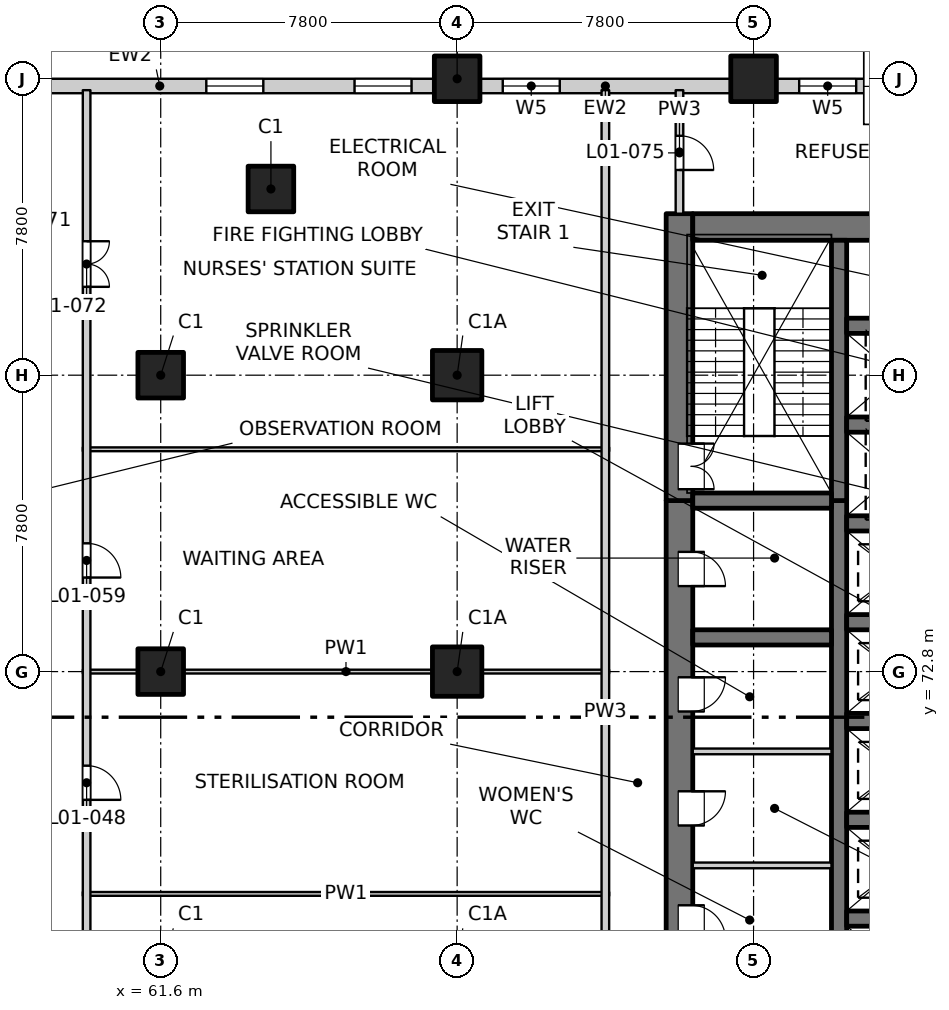
"""IFC4 building model, lengths in metres.
Left out: names, types, materials, properties, quantities, classifications, styles, units other than length and angle.
Written with IfcOpenShell. Run it as: python <this file> out.ifc"""

import sys

from ifc_helpers import new_model, si_unit, direction, frame, frame_2d, origin, origin_2d, place, context, subcontext, project, spatial, rectangle, extrude, element, fill, save


model = new_model("IFC4")
c1 = context("Model", 3, precision=1e-05, world=origin(), true_north=direction((0.0, 1.0)))
c2 = subcontext(c1, "Body", "Model", "MODEL_VIEW")
j1 = project(units=[si_unit("LENGTHUNIT", "METRE"), si_unit("PLANEANGLEUNIT", "RADIAN")], contexts=[c1])
p1 = place(None, origin())
s1 = spatial("IfcSite", under=j1, at=p1, CompositionType="ELEMENT")
p2 = place(p1, origin())
s2 = spatial("IfcBuilding", under=s1, at=p2, CompositionType="ELEMENT")
p3 = place(p2, frame((0.0, 0.0, 6.0)))
s3 = spatial("IfcBuildingStorey", under=s2, at=p3, CompositionType="ELEMENT", Elevation=6.0)
for number, where, z_axis, x_axis in (
    (1, (64.5, 85.5, -0.3), (0.0, 0.0, 1.0), (1.0, 0.0, 0.0)),
    (2, (69.4, 88.4, -0.3), (0.0, 0.0, 1.0), (1.0, 0.0, 0.0)),
    (3, (77.2, 88.4, -0.3), (0.0, 0.0, 1.0), (1.0, 0.0, 0.0)),
    (4, (61.6, 72.8, -0.3), (0.0, 0.0, 1.0), (1.0, 0.0, 0.0)),
    (5, (61.6, 80.6, -0.3), (0.0, 0.0, 1.0), (1.0, 0.0, 0.0)),
):
    element("IfcColumn", number, at=place(p3, frame(where, z_axis=z_axis, x_axis=x_axis)), inside=s3, PredefinedType="COLUMN", context=c2, shape_type="SweptSolid", body=[
        extrude(rectangle(XDim=1.2, YDim=1.2, at=origin_2d()), origin(), (0.0, 0.0, 1.0), 4.5),
    ])
for number, where, z_axis, x_axis in (
    (6, (69.4, 72.8, -0.3), (0.0, 0.0, 1.0), (1.0, 0.0, 0.0)),
    (7, (69.4, 80.6, -0.3), (0.0, 0.0, 1.0), (1.0, 0.0, 0.0)),
):
    element("IfcColumn", number, at=place(p3, frame(where, z_axis=z_axis, x_axis=x_axis)), inside=s3, PredefinedType="COLUMN", context=c2, shape_type="SweptSolid", body=[
        extrude(rectangle(XDim=1.3, YDim=1.3, at=origin_2d()), origin(), (0.0, 0.0, 1.0), 4.5),
    ])
p4 = place(p3, frame((75.25, 54.9, -0.3), z_axis=(0.0, 0.0, 1.0), x_axis=(0.0, 1.0, 0.0)))
e8 = element("IfcWall", 8, at=p4, inside=s3, PredefinedType="SOLIDWALL", context=c2, shape_type="SweptSolid", body=[
    extrude(rectangle(XDim=22.4, YDim=0.7, at=frame_2d((11.2, 0.0))), origin(), (0.0, 0.0, 1.0), 4.5),
])
p5 = place(p4, frame((7.55, 0.0, 0.3)))
e9 = element("IfcOpeningElement", 9, at=p5, cuts=e8, PredefinedType="OPENING", context=c2, shape_type="SweptSolid", body=[
    extrude(rectangle(XDim=0.9, YDim=2.1, at=frame_2d((0.45, 1.05))), frame((0.0, 0.36, 0.0), z_axis=(0.0, -1.0, 0.0), x_axis=(1.0, 0.0, 0.0)), (0.0, 0.0, 1.0), 0.72),
])
p6 = place(p4, frame((10.85, 0.0, 0.3)))
e10 = element("IfcOpeningElement", 10, at=p6, cuts=e8, PredefinedType="OPENING", context=c2, shape_type="SweptSolid", body=[
    extrude(rectangle(XDim=0.9, YDim=2.1, at=frame_2d((0.45, 1.05))), frame((0.0, 0.36, 0.0), z_axis=(0.0, -1.0, 0.0), x_axis=(1.0, 0.0, 0.0)), (0.0, 0.0, 1.0), 0.72),
])
p7 = place(p4, frame((13.85, 0.0, 0.3)))
e11 = element("IfcOpeningElement", 11, at=p7, cuts=e8, PredefinedType="OPENING", context=c2, shape_type="SweptSolid", body=[
    extrude(rectangle(XDim=0.9, YDim=2.1, at=frame_2d((0.45, 1.05))), frame((0.0, 0.36, 0.0), z_axis=(0.0, -1.0, 0.0), x_axis=(1.0, 0.0, 0.0)), (0.0, 0.0, 1.0), 0.72),
])
p8 = place(p4, frame((16.85, 0.0, 0.3)))
e12 = element("IfcOpeningElement", 12, at=p8, cuts=e8, PredefinedType="OPENING", context=c2, shape_type="SweptSolid", body=[
    extrude(rectangle(XDim=0.9, YDim=2.1, at=frame_2d((0.45, 1.05))), frame((0.0, 0.36, 0.0), z_axis=(0.0, -1.0, 0.0), x_axis=(1.0, 0.0, 0.0)), (0.0, 0.0, 1.0), 0.72),
])
p9 = place(p4, frame((20.15, 0.0, 0.3)))
e13 = element("IfcOpeningElement", 13, at=p9, cuts=e8, PredefinedType="OPENING", context=c2, shape_type="SweptSolid", body=[
    extrude(rectangle(XDim=0.9, YDim=2.1, at=frame_2d((0.45, 1.05))), frame((0.0, 0.36, 0.0), z_axis=(0.0, -1.0, 0.0), x_axis=(1.0, 0.0, 0.0)), (0.0, 0.0, 1.0), 0.72),
])
p10 = place(p3, frame((75.25, 77.3, -0.3), z_axis=(0.0, 0.0, 1.0), x_axis=(0.0, 1.0, 0.0)))
e14 = element("IfcWall", 14, at=p10, inside=s3, PredefinedType="SOLIDWALL", context=c2, shape_type="SweptSolid", body=[
    extrude(rectangle(XDim=7.55, YDim=0.7, at=frame_2d((3.775, 0.0))), origin(), (0.0, 0.0, 1.0), 4.5),
])
p11 = place(p10, frame((0.3, 0.0, 0.3)))
e15 = element("IfcOpeningElement", 15, at=p11, cuts=e14, PredefinedType="OPENING", context=c2, shape_type="SweptSolid", body=[
    extrude(rectangle(XDim=1.2, YDim=2.1, at=frame_2d((0.6, 1.05))), frame((0.0, 0.36, 0.0), z_axis=(0.0, -1.0, 0.0), x_axis=(1.0, 0.0, 0.0)), (0.0, 0.0, 1.0), 0.72),
])
p12 = place(p3, frame((75.6, 84.5, -0.3), z_axis=(0.0, 0.0, 1.0), x_axis=(1.0, 0.0, 0.0)))
e16 = element("IfcWall", 16, at=p12, inside=s3, PredefinedType="SOLIDWALL", context=c2, shape_type="SweptSolid", body=[
    extrude(rectangle(XDim=18.8, YDim=0.7, at=frame_2d((9.4, 0.0))), origin(), (0.0, 0.0, 1.0), 4.5),
])
p13 = place(p3, frame((79.45, 60.9, -0.3), z_axis=(0.0, 0.0, 1.0), x_axis=(0.0, 1.0, 0.0)))
e17 = element("IfcWall", 17, at=p13, inside=s3, PredefinedType="SOLIDWALL", context=c2, shape_type="SweptSolid", body=[
    extrude(rectangle(XDim=16.4, YDim=0.4, at=frame_2d((8.2, 0.0))), origin(), (0.0, 0.0, 1.0), 4.5),
])
p14 = place(p3, frame((79.45, 77.3, -0.3), z_axis=(0.0, 0.0, 1.0), x_axis=(0.0, 1.0, 0.0)))
e18 = element("IfcWall", 18, at=p14, inside=s3, PredefinedType="SOLIDWALL", context=c2, shape_type="SweptSolid", body=[
    extrude(rectangle(XDim=6.85, YDim=0.4, at=frame_2d((3.425, 0.0))), origin(), (0.0, 0.0, 1.0), 4.5),
])
for number, where, z_axis, x_axis in (
    (19, (79.65, 66.3, -0.3), (0.0, 0.0, 1.0), (1.0, 0.0, 0.0)),
    (20, (79.65, 68.9, -0.3), (0.0, 0.0, 1.0), (1.0, 0.0, 0.0)),
    (21, (79.65, 71.5, -0.3), (0.0, 0.0, 1.0), (1.0, 0.0, 0.0)),
    (22, (79.65, 74.1, -0.3), (0.0, 0.0, 1.0), (1.0, 0.0, 0.0)),
    (23, (79.65, 76.7, -0.3), (0.0, 0.0, 1.0), (1.0, 0.0, 0.0)),
    (24, (79.65, 79.3, -0.3), (0.0, 0.0, 1.0), (1.0, 0.0, 0.0)),
    (25, (79.65, 81.9, -0.3), (0.0, 0.0, 1.0), (1.0, 0.0, 0.0)),
):
    element("IfcWall", number, at=place(p3, frame(where, z_axis=z_axis, x_axis=x_axis)), inside=s3, PredefinedType="SOLIDWALL", context=c2, shape_type="SweptSolid", body=[
        extrude(rectangle(XDim=3.0, YDim=0.4, at=frame_2d((1.5, 0.0))), origin(), (0.0, 0.0, 1.0), 4.5),
    ])
for number, where, z_axis, x_axis in (
    (26, (75.6, 73.7, -0.3), (0.0, 0.0, 1.0), (1.0, 0.0, 0.0)),
    (27, (75.6, 77.3, -0.3), (0.0, 0.0, 1.0), (1.0, 0.0, 0.0)),
):
    element("IfcWall", number, at=place(p3, frame(where, z_axis=z_axis, x_axis=x_axis)), inside=s3, PredefinedType="SOLIDWALL", context=c2, shape_type="SweptSolid", body=[
        extrude(rectangle(XDim=3.65, YDim=0.4, at=frame_2d((1.825, 0.0))), origin(), (0.0, 0.0, 1.0), 4.5),
    ])
p15 = place(p3, frame((54.35, 88.21, 0.0), z_axis=(0.0, 0.0, 1.0), x_axis=(1.0, 0.0, 0.0)))
e28 = element("IfcWall", 28, at=p15, inside=s3, PredefinedType="SOLIDWALL", context=c2, shape_type="SweptSolid", body=[
    extrude(rectangle(XDim=14.45, YDim=0.38, at=frame_2d((7.225, 0.0))), origin(), (0.0, 0.0, 1.0), 4.2),
])
p16 = place(p15, frame((0.65, 0.0, 0.9)))
e29 = element("IfcOpeningElement", 29, at=p16, cuts=e28, PredefinedType="OPENING", context=c2, shape_type="SweptSolid", body=[
    extrude(rectangle(XDim=1.5, YDim=1.5, at=frame_2d((0.75, 0.75))), frame((0.0, 0.2, 0.0), z_axis=(0.0, -1.0, 0.0), x_axis=(1.0, 0.0, 0.0)), (0.0, 0.0, 1.0), 0.4),
])
p17 = place(p15, frame((8.45, 0.0, 0.9)))
e30 = element("IfcOpeningElement", 30, at=p17, cuts=e28, PredefinedType="OPENING", context=c2, shape_type="SweptSolid", body=[
    extrude(rectangle(XDim=1.5, YDim=1.5, at=frame_2d((0.75, 0.75))), frame((0.0, 0.2, 0.0), z_axis=(0.0, -1.0, 0.0), x_axis=(1.0, 0.0, 0.0)), (0.0, 0.0, 1.0), 0.4),
])
p18 = place(p15, frame((12.35, 0.0, 0.9)))
e31 = element("IfcOpeningElement", 31, at=p18, cuts=e28, PredefinedType="OPENING", context=c2, shape_type="SweptSolid", body=[
    extrude(rectangle(XDim=1.5, YDim=1.5, at=frame_2d((0.75, 0.75))), frame((0.0, 0.2, 0.0), z_axis=(0.0, -1.0, 0.0), x_axis=(1.0, 0.0, 0.0)), (0.0, 0.0, 1.0), 0.4),
])
p19 = place(p3, frame((70.0, 88.21, 0.0), z_axis=(0.0, 0.0, 1.0), x_axis=(1.0, 0.0, 0.0)))
e32 = element("IfcWall", 32, at=p19, inside=s3, PredefinedType="SOLIDWALL", context=c2, shape_type="SweptSolid", body=[
    extrude(rectangle(XDim=6.6, YDim=0.38, at=frame_2d((3.3, 0.0))), origin(), (0.0, 0.0, 1.0), 4.2),
])
p20 = place(p19, frame((0.6, 0.0, 0.9)))
e33 = element("IfcOpeningElement", 33, at=p20, cuts=e32, PredefinedType="OPENING", context=c2, shape_type="SweptSolid", body=[
    extrude(rectangle(XDim=1.5, YDim=1.5, at=frame_2d((0.75, 0.75))), frame((0.0, 0.2, 0.0), z_axis=(0.0, -1.0, 0.0), x_axis=(1.0, 0.0, 0.0)), (0.0, 0.0, 1.0), 0.4),
])
p21 = place(p3, frame((77.8, 88.21, 0.0), z_axis=(0.0, 0.0, 1.0), x_axis=(1.0, 0.0, 0.0)))
e34 = element("IfcWall", 34, at=p21, inside=s3, PredefinedType="SOLIDWALL", context=c2, shape_type="SweptSolid", body=[
    extrude(rectangle(XDim=6.6, YDim=0.38, at=frame_2d((3.3, 0.0))), origin(), (0.0, 0.0, 1.0), 4.2),
])
p22 = place(p21, frame((0.6, 0.0, 0.9)))
e35 = element("IfcOpeningElement", 35, at=p22, cuts=e34, PredefinedType="OPENING", context=c2, shape_type="SweptSolid", body=[
    extrude(rectangle(XDim=1.5, YDim=1.5, at=frame_2d((0.75, 0.75))), frame((0.0, 0.2, 0.0), z_axis=(0.0, -1.0, 0.0), x_axis=(1.0, 0.0, 0.0)), (0.0, 0.0, 1.0), 0.4),
])
p23 = place(p21, frame((4.5, 0.0, 0.9)))
e36 = element("IfcOpeningElement", 36, at=p23, cuts=e34, PredefinedType="OPENING", context=c2, shape_type="SweptSolid", body=[
    extrude(rectangle(XDim=1.5, YDim=1.5, at=frame_2d((0.75, 0.75))), frame((0.0, 0.2, 0.0), z_axis=(0.0, -1.0, 0.0), x_axis=(1.0, 0.0, 0.0)), (0.0, 0.0, 1.0), 0.4),
])
p24 = place(p3, frame((59.55, 66.95, 0.0), z_axis=(0.0, 0.0, 1.0), x_axis=(1.0, 0.0, 0.0)))
e37 = element("IfcWall", 37, at=p24, inside=s3, PredefinedType="PARTITIONING", context=c2, shape_type="SweptSolid", body=[
    extrude(rectangle(XDim=13.85, YDim=0.1, at=frame_2d((6.925, 0.0))), origin(), (0.0, 0.0, 1.0), 4.2),
])
for number, where, z_axis, x_axis in (
    (38, (75.6, 67.7, 0.0), (0.0, 0.0, 1.0), (1.0, 0.0, 0.0)),
    (39, (75.6, 70.7, 0.0), (0.0, 0.0, 1.0), (1.0, 0.0, 0.0)),
):
    element("IfcWall", number, at=place(p3, frame(where, z_axis=z_axis, x_axis=x_axis)), inside=s3, PredefinedType="PARTITIONING", context=c2, shape_type="SweptSolid", body=[
        extrude(rectangle(XDim=3.65, YDim=0.15, at=frame_2d((1.825, 0.0))), origin(), (0.0, 0.0, 1.0), 4.2),
    ])
for number, where, z_axis, x_axis in (
    (40, (59.55, 72.8, 0.0), (0.0, 0.0, 1.0), (1.0, 0.0, 0.0)),
    (41, (59.55, 78.65, 0.0), (0.0, 0.0, 1.0), (1.0, 0.0, 0.0)),
):
    element("IfcWall", number, at=place(p3, frame(where, z_axis=z_axis, x_axis=x_axis)), inside=s3, PredefinedType="PARTITIONING", context=c2, shape_type="SweptSolid", body=[
        extrude(rectangle(XDim=13.85, YDim=0.1, at=frame_2d((6.925, 0.0))), origin(), (0.0, 0.0, 1.0), 4.2),
    ])
p25 = place(p3, frame((59.65, 55.35, 0.0), z_axis=(0.0, 0.0, 1.0), x_axis=(0.0, 1.0, 0.0)))
e42 = element("IfcWall", 42, at=p25, inside=s3, PredefinedType="PARTITIONING", context=c2, shape_type="SweptSolid", body=[
    extrude(rectangle(XDim=32.75, YDim=0.2, at=frame_2d((16.375, 0.0))), origin(), (0.0, 0.0, 1.0), 4.2),
])
p26 = place(p25, frame((5.15, 0.0, 0.0)))
e43 = element("IfcOpeningElement", 43, at=p26, cuts=e42, PredefinedType="OPENING", context=c2, shape_type="SweptSolid", body=[
    extrude(rectangle(XDim=1.2, YDim=2.1, at=frame_2d((0.6, 1.05))), frame((0.0, 0.11, 0.0), z_axis=(0.0, -1.0, 0.0), x_axis=(1.0, 0.0, 0.0)), (0.0, 0.0, 1.0), 0.22),
])
p27 = place(p25, frame((14.075, 0.0, 0.0)))
e44 = element("IfcOpeningElement", 44, at=p27, cuts=e42, PredefinedType="OPENING", context=c2, shape_type="SweptSolid", body=[
    extrude(rectangle(XDim=0.9, YDim=2.1, at=frame_2d((0.45, 1.05))), frame((0.0, 0.11, 0.0), z_axis=(0.0, -1.0, 0.0), x_axis=(1.0, 0.0, 0.0)), (0.0, 0.0, 1.0), 0.22),
])
p28 = place(p25, frame((19.925, 0.0, 0.0)))
e45 = element("IfcOpeningElement", 45, at=p28, cuts=e42, PredefinedType="OPENING", context=c2, shape_type="SweptSolid", body=[
    extrude(rectangle(XDim=0.9, YDim=2.1, at=frame_2d((0.45, 1.05))), frame((0.0, 0.11, 0.0), z_axis=(0.0, -1.0, 0.0), x_axis=(1.0, 0.0, 0.0)), (0.0, 0.0, 1.0), 0.22),
])
p29 = place(p25, frame((27.575, 0.0, 0.0)))
e46 = element("IfcOpeningElement", 46, at=p29, cuts=e42, PredefinedType="OPENING", context=c2, shape_type="SweptSolid", body=[
    extrude(rectangle(XDim=1.2, YDim=2.1, at=frame_2d((0.6, 1.05))), frame((0.0, 0.11, 0.0), z_axis=(0.0, -1.0, 0.0), x_axis=(1.0, 0.0, 0.0)), (0.0, 0.0, 1.0), 0.22),
])
p30 = place(p3, frame((73.3, 55.35, 0.0), z_axis=(0.0, 0.0, 1.0), x_axis=(0.0, 1.0, 0.0)))
e47 = element("IfcWall", 47, at=p30, inside=s3, PredefinedType="PARTITIONING", context=c2, shape_type="SweptSolid", body=[
    extrude(rectangle(XDim=32.75, YDim=0.2, at=frame_2d((16.375, 0.0))), origin(), (0.0, 0.0, 1.0), 4.2),
])
p31 = place(p3, frame((75.25, 84.85, 0.0), z_axis=(0.0, 0.0, 1.0), x_axis=(0.0, 1.0, 0.0)))
e48 = element("IfcWall", 48, at=p31, inside=s3, PredefinedType="PARTITIONING", context=c2, shape_type="SweptSolid", body=[
    extrude(rectangle(XDim=3.25, YDim=0.2, at=frame_2d((1.625, 0.0))), origin(), (0.0, 0.0, 1.0), 4.2),
])
p32 = place(p31, frame((1.15, 0.0, 0.0)))
e49 = element("IfcOpeningElement", 49, at=p32, cuts=e48, PredefinedType="OPENING", context=c2, shape_type="SweptSolid", body=[
    extrude(rectangle(XDim=0.9, YDim=2.1, at=frame_2d((0.45, 1.05))), frame((0.0, 0.11, 0.0), z_axis=(0.0, -1.0, 0.0), x_axis=(1.0, 0.0, 0.0)), (0.0, 0.0, 1.0), 0.22),
])
p33 = place(p17, origin())
e50 = element("IfcWindow", 50, at=p33, inside=s3, PartitioningType="SINGLE_PANEL", PredefinedType="WINDOW", context=c2, shape_type="SweptSolid", body=[
    extrude(rectangle(XDim=1.5, YDim=1.5, at=frame_2d((0.75, 0.75))), frame((0.0, 0.03, 0.0), z_axis=(0.0, -1.0, 0.0), x_axis=(1.0, 0.0, 0.0)), (0.0, 0.0, 1.0), 0.06),
])
fill(e30, e50)
p34 = place(p18, origin())
e51 = element("IfcWindow", 51, at=p34, inside=s3, PartitioningType="SINGLE_PANEL", PredefinedType="WINDOW", context=c2, shape_type="SweptSolid", body=[
    extrude(rectangle(XDim=1.5, YDim=1.5, at=frame_2d((0.75, 0.75))), frame((0.0, 0.03, 0.0), z_axis=(0.0, -1.0, 0.0), x_axis=(1.0, 0.0, 0.0)), (0.0, 0.0, 1.0), 0.06),
])
fill(e31, e51)
p35 = place(p20, origin())
e52 = element("IfcWindow", 52, at=p35, inside=s3, PartitioningType="SINGLE_PANEL", PredefinedType="WINDOW", context=c2, shape_type="SweptSolid", body=[
    extrude(rectangle(XDim=1.5, YDim=1.5, at=frame_2d((0.75, 0.75))), frame((0.0, 0.03, 0.0), z_axis=(0.0, -1.0, 0.0), x_axis=(1.0, 0.0, 0.0)), (0.0, 0.0, 1.0), 0.06),
])
fill(e33, e52)
p36 = place(p22, origin())
e53 = element("IfcWindow", 53, at=p36, inside=s3, PartitioningType="SINGLE_PANEL", PredefinedType="WINDOW", context=c2, shape_type="SweptSolid", body=[
    extrude(rectangle(XDim=1.5, YDim=1.5, at=frame_2d((0.75, 0.75))), frame((0.0, 0.03, 0.0), z_axis=(0.0, -1.0, 0.0), x_axis=(1.0, 0.0, 0.0)), (0.0, 0.0, 1.0), 0.06),
])
fill(e35, e53)
p37 = place(p6, origin())
e54 = element("IfcDoor", 54, at=p37, inside=s3, OperationType="SINGLE_SWING_RIGHT", PredefinedType="DOOR", context=c2, shape_type="SweptSolid", body=[
    extrude(rectangle(XDim=0.9, YDim=2.1, at=frame_2d((0.45, 1.05))), frame((0.0, -0.285, 0.0), z_axis=(0.0, -1.0, 0.0), x_axis=(1.0, 0.0, 0.0)), (0.0, 0.0, 1.0), 0.05),
])
fill(e10, e54)
p38 = place(p7, origin())
e55 = element("IfcDoor", 55, at=p38, inside=s3, OperationType="SINGLE_SWING_LEFT", PredefinedType="DOOR", context=c2, shape_type="SweptSolid", body=[
    extrude(rectangle(XDim=0.9, YDim=2.1, at=frame_2d((0.45, 1.05))), frame((0.0, -0.285, 0.0), z_axis=(0.0, -1.0, 0.0), x_axis=(1.0, 0.0, 0.0)), (0.0, 0.0, 1.0), 0.05),
])
fill(e11, e55)
p39 = place(p27, origin())
e56 = element("IfcDoor", 56, at=p39, inside=s3, OperationType="SINGLE_SWING_RIGHT", PredefinedType="DOOR", context=c2, shape_type="SweptSolid", body=[
    extrude(rectangle(XDim=0.9, YDim=2.1, at=frame_2d((0.45, 1.05))), frame((0.0, 0.025, 0.0), z_axis=(0.0, -1.0, 0.0), x_axis=(1.0, 0.0, 0.0)), (0.0, 0.0, 1.0), 0.05),
])
fill(e44, e56)
p40 = place(p8, origin())
e57 = element("IfcDoor", 57, at=p40, inside=s3, OperationType="SINGLE_SWING_LEFT", PredefinedType="DOOR", context=c2, shape_type="SweptSolid", body=[
    extrude(rectangle(XDim=0.9, YDim=2.1, at=frame_2d((0.45, 1.05))), frame((0.0, -0.285, 0.0), z_axis=(0.0, -1.0, 0.0), x_axis=(1.0, 0.0, 0.0)), (0.0, 0.0, 1.0), 0.05),
])
fill(e12, e57)
p41 = place(p9, origin())
e58 = element("IfcDoor", 58, at=p41, inside=s3, OperationType="SINGLE_SWING_RIGHT", PredefinedType="DOOR", context=c2, shape_type="SweptSolid", body=[
    extrude(rectangle(XDim=0.9, YDim=2.1, at=frame_2d((0.45, 1.05))), frame((0.0, -0.285, 0.0), z_axis=(0.0, -1.0, 0.0), x_axis=(1.0, 0.0, 0.0)), (0.0, 0.0, 1.0), 0.05),
])
fill(e13, e58)
p42 = place(p28, origin())
e59 = element("IfcDoor", 59, at=p42, inside=s3, OperationType="SINGLE_SWING_RIGHT", PredefinedType="DOOR", context=c2, shape_type="SweptSolid", body=[
    extrude(rectangle(XDim=0.9, YDim=2.1, at=frame_2d((0.45, 1.05))), frame((0.0, 0.025, 0.0), z_axis=(0.0, -1.0, 0.0), x_axis=(1.0, 0.0, 0.0)), (0.0, 0.0, 1.0), 0.05),
])
fill(e45, e59)
p43 = place(p11, origin())
e60 = element("IfcDoor", 60, at=p43, inside=s3, OperationType="DOUBLE_DOOR_SINGLE_SWING", PredefinedType="DOOR", context=c2, shape_type="SweptSolid", body=[
    extrude(rectangle(XDim=1.2, YDim=2.1, at=frame_2d((0.6, 1.05))), frame((0.0, -0.285, 0.0), z_axis=(0.0, -1.0, 0.0), x_axis=(1.0, 0.0, 0.0)), (0.0, 0.0, 1.0), 0.05),
])
fill(e15, e60)
p44 = place(p29, origin())
e61 = element("IfcDoor", 61, at=p44, inside=s3, OperationType="DOUBLE_DOOR_SINGLE_SWING", PredefinedType="DOOR", context=c2, shape_type="SweptSolid", body=[
    extrude(rectangle(XDim=1.2, YDim=2.1, at=frame_2d((0.6, 1.05))), frame((0.0, 0.025, 0.0), z_axis=(0.0, -1.0, 0.0), x_axis=(1.0, 0.0, 0.0)), (0.0, 0.0, 1.0), 0.05),
])
fill(e46, e61)
p45 = place(p32, origin())
e62 = element("IfcDoor", 62, at=p45, inside=s3, OperationType="SINGLE_SWING_RIGHT", PredefinedType="DOOR", context=c2, shape_type="SweptSolid", body=[
    extrude(rectangle(XDim=0.9, YDim=2.1, at=frame_2d((0.45, 1.05))), frame((0.0, 0.025, 0.0), z_axis=(0.0, -1.0, 0.0), x_axis=(1.0, 0.0, 0.0)), (0.0, 0.0, 1.0), 0.05),
])
fill(e49, e62)
save(model, sys.argv[1])
